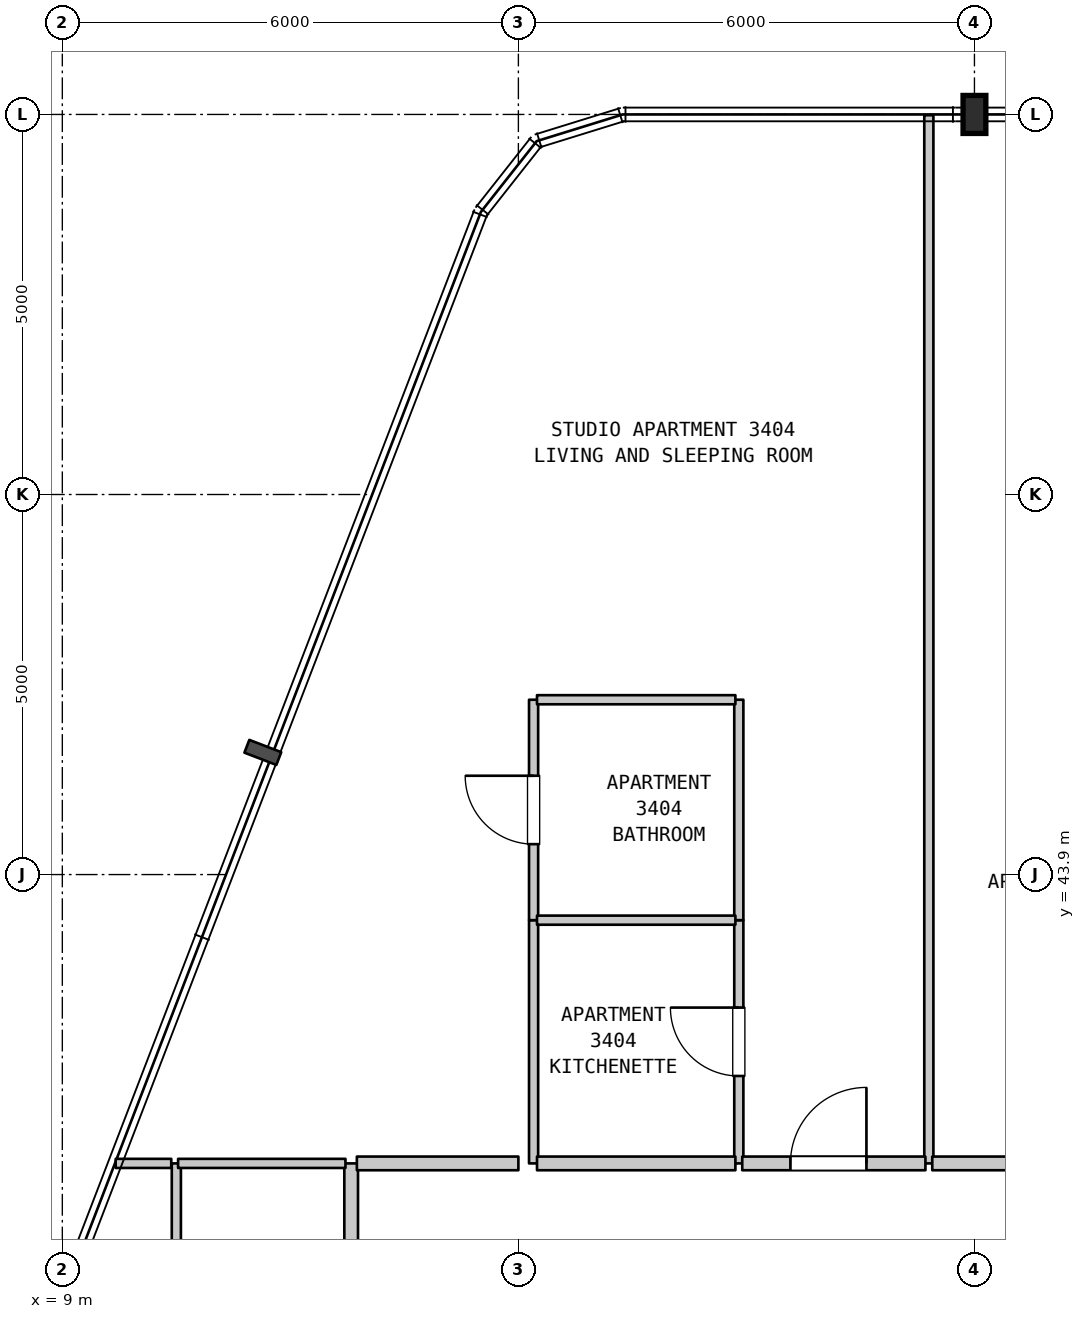
"""IFC4 building model, lengths in metres.
Left out: names, types, materials, properties, quantities, classifications, styles, units other than length and angle.
Written with IfcOpenShell. Run it as: python <this file> out.ifc"""

import sys

from ifc_helpers import new_model, si_unit, direction, frame, frame_2d, origin, origin_2d, place, context, subcontext, project, spatial, rectangle, i_section, extrude, element, fill, save


model = new_model("IFC4")
c1 = context("Model", 3, precision=1e-05, world=origin(), true_north=direction((0.0, 1.0)))
c2 = subcontext(c1, "Body", "Model", "MODEL_VIEW")
j1 = project(units=[si_unit("LENGTHUNIT", "METRE"), si_unit("PLANEANGLEUNIT", "RADIAN")], contexts=[c1])
p1 = place(None, origin())
s1 = spatial("IfcSite", under=j1, at=p1, CompositionType="ELEMENT")
p2 = place(p1, origin())
s2 = spatial("IfcBuilding", under=s1, at=p2, CompositionType="ELEMENT")
p3 = place(p2, frame((0.0, 0.0, 140.9)))
s3 = spatial("IfcBuildingStorey", under=s2, at=p3, CompositionType="ELEMENT", Elevation=140.9)
p4 = place(p3, frame((21.0, 53.9, 0.0), z_axis=(0.0, 0.0, 1.0), x_axis=(1.0, 0.0, 0.0)))
e1 = element("IfcColumn", 1, at=p4, inside=s3, PredefinedType="COLUMN", context=c2, shape_type="SweptSolid", body=[
    extrude(i_section(OverallWidth=0.3, OverallDepth=0.5, WebThickness=0.014, FlangeThickness=0.028, FilletRadius=0.027, at=origin_2d()), origin(), (0.0, 0.0, 1.0), 3.7),
])
p5 = place(p3, frame((10.5, 31.45, 0.0), z_axis=(0.0, 0.0, 1.0), x_axis=(0.0, 1.0, 0.0)))
e2 = element("IfcWall", 2, at=p5, inside=s3, PredefinedType="PARTITIONING", context=c2, shape_type="SweptSolid", body=[
    extrude(rectangle(XDim=8.65, YDim=0.12, at=frame_2d((4.325, 0.0))), origin(), (0.0, 0.0, 1.0), 3.385),
])
p6 = place(p3, frame((12.8, 31.45, 0.0), z_axis=(0.0, 0.0, 1.0), x_axis=(0.0, 1.0, 0.0)))
e3 = element("IfcWall", 3, at=p6, inside=s3, PredefinedType="STANDARD", context=c2, shape_type="SweptSolid", body=[
    extrude(rectangle(XDim=8.65, YDim=0.18, at=frame_2d((4.325, 0.0))), origin(), (0.0, 0.0, 1.0), 3.385),
])
p7 = place(p3, frame((15.2, 40.1, 0.0), z_axis=(0.0, 0.0, 1.0), x_axis=(0.0, 1.0, 0.0)))
e4 = element("IfcWall", 4, at=p7, inside=s3, PredefinedType="PARTITIONING", context=c2, shape_type="SweptSolid", body=[
    extrude(rectangle(XDim=3.2, YDim=0.12, at=frame_2d((1.6, 0.0))), origin(), (0.0, 0.0, 1.0), 3.385),
])
p8 = place(p3, frame((15.2, 43.3, 0.0), z_axis=(0.0, 0.0, 1.0), x_axis=(0.0, 1.0, 0.0)))
e5 = element("IfcWall", 5, at=p8, inside=s3, PredefinedType="PARTITIONING", context=c2, shape_type="SweptSolid", body=[
    extrude(rectangle(XDim=2.9, YDim=0.12, at=frame_2d((1.45, 0.0))), origin(), (0.0, 0.0, 1.0), 3.385),
])
p9 = place(p8, frame((1.0, 0.0, 0.0)))
e6 = element("IfcOpeningElement", 6, at=p9, cuts=e5, PredefinedType="OPENING", context=c2, shape_type="SweptSolid", body=[
    extrude(rectangle(XDim=0.9, YDim=2.1, at=frame_2d((0.45, 1.05))), frame((0.0, 0.07, 0.0), z_axis=(0.0, -1.0, 0.0), x_axis=(1.0, 0.0, 0.0)), (0.0, 0.0, 1.0), 0.14),
])
p10 = place(p3, frame((17.9, 40.1, 0.0), z_axis=(0.0, 0.0, 1.0), x_axis=(0.0, 1.0, 0.0)))
e7 = element("IfcWall", 7, at=p10, inside=s3, PredefinedType="PARTITIONING", context=c2, shape_type="SweptSolid", body=[
    extrude(rectangle(XDim=3.2, YDim=0.12, at=frame_2d((1.6, 0.0))), origin(), (0.0, 0.0, 1.0), 3.385),
])
p11 = place(p10, frame((1.15, 0.0, 0.0)))
e8 = element("IfcOpeningElement", 8, at=p11, cuts=e7, PredefinedType="OPENING", context=c2, shape_type="SweptSolid", body=[
    extrude(rectangle(XDim=0.9, YDim=2.15, at=frame_2d((0.45, 1.075))), frame((0.0, 0.07, 0.0), z_axis=(0.0, -1.0, 0.0), x_axis=(1.0, 0.0, 0.0)), (0.0, 0.0, 1.0), 0.14),
])
p12 = place(p3, frame((17.9, 43.3, 0.0), z_axis=(0.0, 0.0, 1.0), x_axis=(0.0, 1.0, 0.0)))
e9 = element("IfcWall", 9, at=p12, inside=s3, PredefinedType="PARTITIONING", context=c2, shape_type="SweptSolid", body=[
    extrude(rectangle(XDim=2.9, YDim=0.12, at=frame_2d((1.45, 0.0))), origin(), (0.0, 0.0, 1.0), 3.385),
])
p13 = place(p3, frame((20.4, 40.1, 0.0), z_axis=(0.0, 0.0, 1.0), x_axis=(0.0, 1.0, 0.0)))
e10 = element("IfcWall", 10, at=p13, inside=s3, PredefinedType="PARTITIONING", context=c2, shape_type="SweptSolid", body=[
    extrude(rectangle(XDim=13.79, YDim=0.12, at=frame_2d((6.895, 0.0))), origin(), (0.0, 0.0, 1.0), 3.385),
])
p14 = place(p3, frame((9.702, 40.1, 0.0), z_axis=(0.0, 0.0, 1.0), x_axis=(1.0, 0.0, 0.0)))
e11 = element("IfcWall", 11, at=p14, inside=s3, PredefinedType="PARTITIONING", context=c2, shape_type="SweptSolid", body=[
    extrude(rectangle(XDim=0.731, YDim=0.12, at=frame_2d((0.366, 0.0))), origin(), (0.0, 0.0, 1.0), 3.385),
])
p15 = place(p3, frame((10.523, 40.1, 0.0), z_axis=(0.0, 0.0, 1.0), x_axis=(1.0, 0.0, 0.0)))
e12 = element("IfcWall", 12, at=p15, inside=s3, PredefinedType="PARTITIONING", context=c2, shape_type="SweptSolid", body=[
    extrude(rectangle(XDim=2.202, YDim=0.12, at=frame_2d((1.101, 0.0))), origin(), (0.0, 0.0, 1.0), 3.385),
])
p16 = place(p3, frame((12.875, 40.1, 0.0), z_axis=(0.0, 0.0, 1.0), x_axis=(1.0, 0.0, 0.0)))
e13 = element("IfcWall", 13, at=p16, inside=s3, PredefinedType="STANDARD", context=c2, shape_type="SweptSolid", body=[
    extrude(rectangle(XDim=2.125, YDim=0.18, at=frame_2d((1.062, 0.0))), origin(), (0.0, 0.0, 1.0), 3.385),
])
p17 = place(p3, frame((15.245, 40.1, 0.0), z_axis=(0.0, 0.0, 1.0), x_axis=(1.0, 0.0, 0.0)))
e14 = element("IfcWall", 14, at=p17, inside=s3, PredefinedType="STANDARD", context=c2, shape_type="SweptSolid", body=[
    extrude(rectangle(XDim=2.61, YDim=0.18, at=frame_2d((1.305, 0.0))), origin(), (0.0, 0.0, 1.0), 3.385),
])
p18 = place(p3, frame((17.945, 40.1, 0.0), z_axis=(0.0, 0.0, 1.0), x_axis=(1.0, 0.0, 0.0)))
e15 = element("IfcWall", 15, at=p18, inside=s3, PredefinedType="STANDARD", context=c2, shape_type="SweptSolid", body=[
    extrude(rectangle(XDim=2.41, YDim=0.18, at=frame_2d((1.205, 0.0))), origin(), (0.0, 0.0, 1.0), 3.385),
])
p19 = place(p18, frame((0.634, 0.0, 0.0)))
e16 = element("IfcOpeningElement", 16, at=p19, cuts=e15, PredefinedType="OPENING", context=c2, shape_type="SweptSolid", body=[
    extrude(rectangle(XDim=1.0, YDim=2.15, at=frame_2d((0.5, 1.075))), frame((0.0, 0.1, 0.0), z_axis=(0.0, -1.0, 0.0), x_axis=(1.0, 0.0, 0.0)), (0.0, 0.0, 1.0), 0.2),
])
p20 = place(p3, frame((20.445, 40.1, 0.0), z_axis=(0.0, 0.0, 1.0), x_axis=(1.0, 0.0, 0.0)))
e17 = element("IfcWall", 17, at=p20, inside=s3, PredefinedType="STANDARD", context=c2, shape_type="SweptSolid", body=[
    extrude(rectangle(XDim=4.3, YDim=0.18, at=frame_2d((2.15, 0.0))), origin(), (0.0, 0.0, 1.0), 3.385),
])
p21 = place(p20, frame((1.65, 0.0, 0.0)))
e18 = element("IfcOpeningElement", 18, at=p21, cuts=e17, PredefinedType="OPENING", context=c2, shape_type="SweptSolid", body=[
    extrude(rectangle(XDim=1.0, YDim=2.15, at=frame_2d((0.5, 1.075))), frame((0.0, 0.1, 0.0), z_axis=(0.0, -1.0, 0.0), x_axis=(1.0, 0.0, 0.0)), (0.0, 0.0, 1.0), 0.2),
])
for number, where, z_axis, x_axis in (
    (19, (15.245, 43.3, 0.0), (0.0, 0.0, 1.0), (1.0, 0.0, 0.0)),
    (20, (15.245, 46.2, 0.0), (0.0, 0.0, 1.0), (1.0, 0.0, 0.0)),
):
    element("IfcWall", number, at=place(p3, frame(where, z_axis=z_axis, x_axis=x_axis)), inside=s3, PredefinedType="PARTITIONING", context=c2, shape_type="SweptSolid", body=[
        extrude(rectangle(XDim=2.61, YDim=0.12, at=frame_2d((1.305, 0.0))), origin(), (0.0, 0.0, 1.0), 3.385),
    ])
p22 = place(p9, origin())
e21 = element("IfcDoor", 21, at=p22, inside=s3, OperationType="SINGLE_SWING_RIGHT", PredefinedType="DOOR", context=c2, shape_type="SweptSolid", body=[
    extrude(rectangle(XDim=0.9, YDim=2.1, at=frame_2d((0.45, 1.05))), frame((0.0, 0.025, 0.0), z_axis=(0.0, -1.0, 0.0), x_axis=(1.0, 0.0, 0.0)), (0.0, 0.0, 1.0), 0.05),
])
fill(e6, e21)
p23 = place(p11, origin())
e22 = element("IfcDoor", 22, at=p23, inside=s3, OperationType="SINGLE_SWING_RIGHT", PredefinedType="DOOR", context=c2, shape_type="SweptSolid", body=[
    extrude(rectangle(XDim=0.9, YDim=2.15, at=frame_2d((0.45, 1.075))), frame((0.0, 0.025, 0.0), z_axis=(0.0, -1.0, 0.0), x_axis=(1.0, 0.0, 0.0)), (0.0, 0.0, 1.0), 0.05),
])
fill(e8, e22)
p24 = place(p19, origin())
e23 = element("IfcDoor", 23, at=p24, inside=s3, OperationType="SINGLE_SWING_RIGHT", PredefinedType="DOOR", context=c2, shape_type="SweptSolid", body=[
    extrude(rectangle(XDim=1.0, YDim=2.15, at=frame_2d((0.5, 1.075))), frame((0.0, 0.025, 0.0), z_axis=(0.0, -1.0, 0.0), x_axis=(1.0, 0.0, 0.0)), (0.0, 0.0, 1.0), 0.05),
])
fill(e16, e23)
save(model, sys.argv[1])
